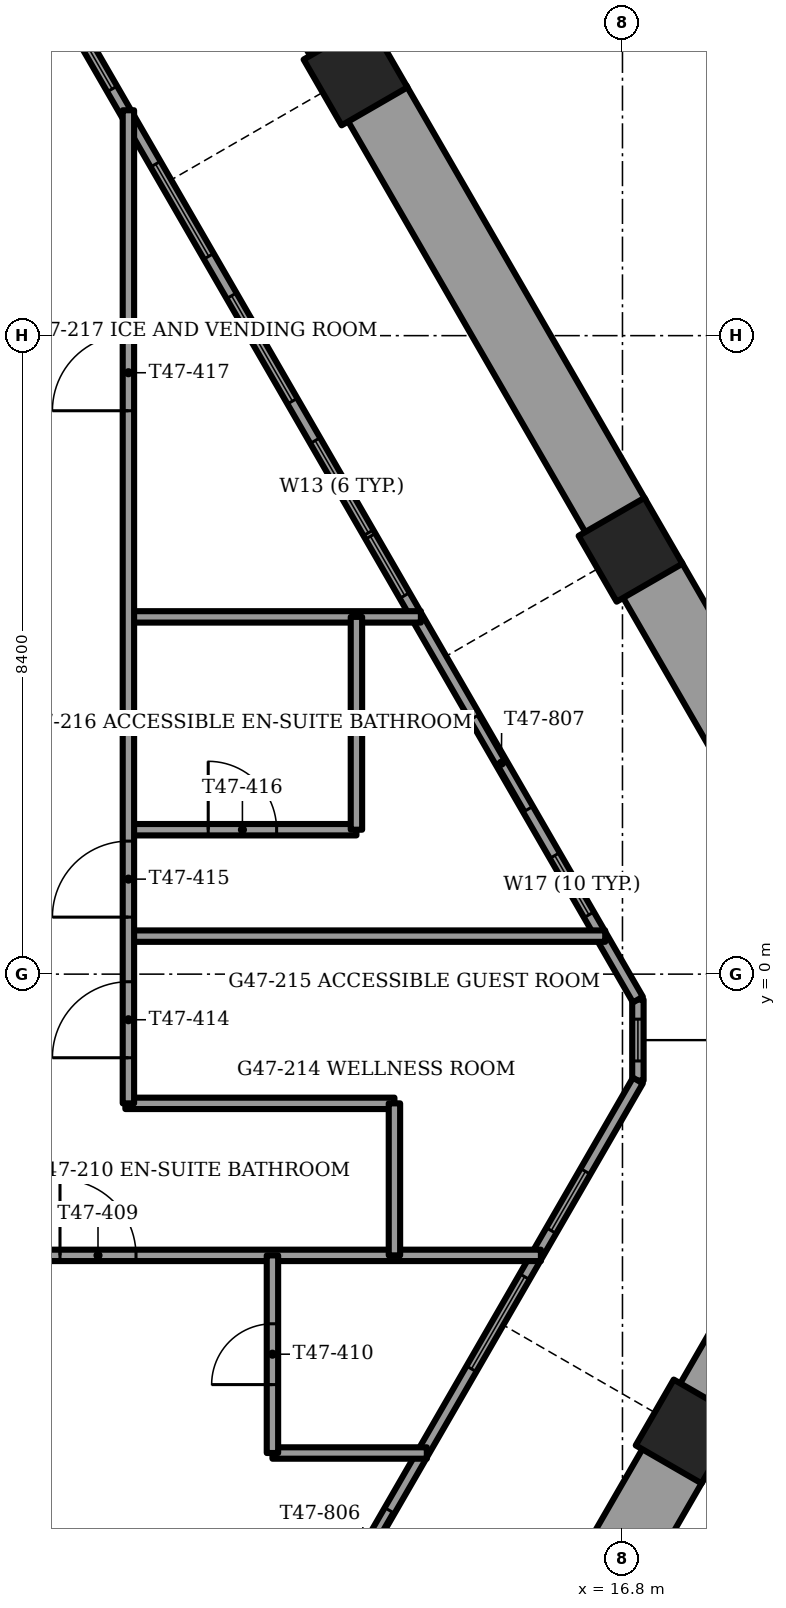
"""IFC4 building model, lengths in metres.
Left out: names, types, materials, properties, quantities, classifications, styles, units other than length and angle.
Written with IfcOpenShell. Run it as: python <this file> out.ifc"""

import sys

from ifc_helpers import new_model, si_unit, direction, frame, frame_2d, origin, origin_2d, place, context, subcontext, project, spatial, rectangle, extrude, element, fill, save


model = new_model("IFC4")
c1 = context("Model", 3, precision=1e-05, world=origin(), true_north=direction((0.0, 1.0)))
c2 = subcontext(c1, "Body", "Model", "MODEL_VIEW")
j1 = project(units=[si_unit("LENGTHUNIT", "METRE"), si_unit("PLANEANGLEUNIT", "RADIAN")], contexts=[c1])
p1 = place(None, origin())
s1 = spatial("IfcSite", under=j1, at=p1, CompositionType="ELEMENT")
p2 = place(p1, origin())
s2 = spatial("IfcBuilding", under=s1, at=p2, CompositionType="ELEMENT")
p3 = place(p2, frame((0.0, 0.0, 190.75)))
s3 = spatial("IfcBuildingStorey", under=s2, at=p3, CompositionType="ELEMENT", Elevation=190.75)
for number, where, z_axis, x_axis in (
    (1, (17.657, -6.017, -1.2), (0.0, 0.0, 1.0), (-0.5, -0.866, 0.0)),
    (2, (16.906, 5.583, -1.2), (0.0, 0.0, 1.0), (0.5, -0.866, 0.0)),
    (3, (13.288, 11.85, -1.2), (0.0, 0.0, 1.0), (0.5, -0.866, 0.0)),
):
    element("IfcColumn", number, at=place(p3, frame(where, z_axis=z_axis, x_axis=x_axis)), inside=s3, PredefinedType="COLUMN", context=c2, shape_type="SweptSolid", body=[
        extrude(rectangle(XDim=1.0, YDim=1.0, at=origin_2d()), origin(), (0.0, 0.0, 1.0), 3.75),
    ])
p4 = place(p3, frame((14.317, -11.901, 0.0), z_axis=(0.0, 0.0, 1.0), x_axis=(0.500013351051, 0.866017695414, 0.0)))
e4 = element("IfcWall", 4, at=p4, inside=s3, PredefinedType="PARAPET", context=c2, shape_type="SweptSolid", body=[
    extrude(rectangle(XDim=6.296, YDim=0.9, at=frame_2d((3.148, 0.0))), origin(), (0.0, 0.0, 1.0), 1.1),
])
p5 = place(p3, frame((17.936, -5.635, 0.0), z_axis=(0.0, 0.0, 1.0), x_axis=(0.500017732557, 0.866015165646, 0.0)))
e5 = element("IfcWall", 5, at=p5, inside=s3, PredefinedType="PARAPET", context=c2, shape_type="SweptSolid", body=[
    extrude(rectangle(XDim=4.962, YDim=0.9, at=frame_2d((2.481, 0.0))), origin(), (0.0, 0.0, 1.0), 1.1),
])
p6 = place(p3, frame((20.417, -0.398, 0.0), z_axis=(0.0, 0.0, 1.0), x_axis=(-0.499977443261, 0.866038426532, 0.0)))
e6 = element("IfcWall", 6, at=p6, inside=s3, PredefinedType="PARAPET", context=c2, shape_type="SweptSolid", body=[
    extrude(rectangle(XDim=6.465, YDim=0.9, at=frame_2d((3.232, 0.0))), origin(), (0.0, 0.0, 1.0), 1.1),
])
p7 = place(p3, frame((16.715, 6.015, 0.0), z_axis=(0.0, 0.0, 1.0), x_axis=(-0.500013351051, 0.866017695414, 0.0)))
e7 = element("IfcWall", 7, at=p7, inside=s3, PredefinedType="PARAPET", context=c2, shape_type="SweptSolid", body=[
    extrude(rectangle(XDim=6.296, YDim=0.9, at=frame_2d((3.148, 0.0))), origin(), (0.0, 0.0, 1.0), 1.1),
])
p8 = place(p3, frame((13.096, 12.282, 0.0), z_axis=(0.0, 0.0, 1.0), x_axis=(-0.500005767435, 0.866022073929, 0.0)))
e8 = element("IfcWall", 8, at=p8, inside=s3, PredefinedType="PARAPET", context=c2, shape_type="SweptSolid", body=[
    extrude(rectangle(XDim=6.465, YDim=0.9, at=frame_2d((3.232, 0.0))), origin(), (0.0, 0.0, 1.0), 1.1),
])
p9 = place(p3, frame((9.714, -14.025, 0.0), z_axis=(0.0, 0.0, 1.0), x_axis=(0.500006098247, 0.866021882931, 0.0)))
e9 = element("IfcWall", 9, at=p9, inside=s3, PredefinedType="SOLIDWALL", context=c2, shape_type="SweptSolid", body=[
    extrude(rectangle(XDim=14.578, YDim=0.15, at=frame_2d((7.289, 0.0))), origin(), (0.0, 0.0, 1.0), 3.45),
])
p10 = place(p9, frame((1.289, 0.0, 0.15)))
e10 = element("IfcOpeningElement", 10, at=p10, cuts=e9, PredefinedType="OPENING", context=c2, shape_type="SweptSolid", body=[
    extrude(rectangle(XDim=1.6, YDim=2.85, at=frame_2d((0.8, 1.425))), frame((0.0, 0.075, 0.0), z_axis=(0.0, -1.0, 0.0), x_axis=(1.0, 0.0, 0.0)), (0.0, 0.0, 1.0), 0.15),
])
p11 = place(p9, frame((3.489, 0.0, 0.0)))
e11 = element("IfcOpeningElement", 11, at=p11, cuts=e9, PredefinedType="OPENING", context=c2, shape_type="SweptSolid", body=[
    extrude(rectangle(XDim=1.4, YDim=2.4, at=frame_2d((0.7, 1.2))), frame((0.0, 0.075, 0.0), z_axis=(0.0, -1.0, 0.0), x_axis=(1.0, 0.0, 0.0)), (0.0, 0.0, 1.0), 0.15),
])
p12 = place(p9, frame((5.489, 0.0, 0.15)))
e12 = element("IfcOpeningElement", 12, at=p12, cuts=e9, PredefinedType="OPENING", context=c2, shape_type="SweptSolid", body=[
    extrude(rectangle(XDim=0.9, YDim=2.85, at=frame_2d((0.45, 1.425))), frame((0.0, 0.075, 0.0), z_axis=(0.0, -1.0, 0.0), x_axis=(1.0, 0.0, 0.0)), (0.0, 0.0, 1.0), 0.15),
])
p13 = place(p9, frame((6.646, 0.0, 0.0)))
e13 = element("IfcOpeningElement", 13, at=p13, cuts=e9, PredefinedType="OPENING", context=c2, shape_type="SweptSolid", body=[
    extrude(rectangle(XDim=1.4, YDim=2.4, at=frame_2d((0.7, 1.2))), frame((0.0, 0.075, 0.0), z_axis=(0.0, -1.0, 0.0), x_axis=(1.0, 0.0, 0.0)), (0.0, 0.0, 1.0), 0.15),
])
p14 = place(p9, frame((12.298, 0.0, 0.15)))
e14 = element("IfcOpeningElement", 14, at=p14, cuts=e9, PredefinedType="OPENING", context=c2, shape_type="SweptSolid", body=[
    extrude(rectangle(XDim=0.9, YDim=2.85, at=frame_2d((0.45, 1.425))), frame((0.0, 0.075, 0.0), z_axis=(0.0, -1.0, 0.0), x_axis=(1.0, 0.0, 0.0)), (0.0, 0.0, 1.0), 0.15),
])
p15 = place(p9, frame((10.198, 0.0, 0.15)))
e15 = element("IfcOpeningElement", 15, at=p15, cuts=e9, PredefinedType="OPENING", context=c2, shape_type="SweptSolid", body=[
    extrude(rectangle(XDim=1.4, YDim=2.85, at=frame_2d((0.7, 1.425))), frame((0.0, 0.075, 0.0), z_axis=(0.0, -1.0, 0.0), x_axis=(1.0, 0.0, 0.0)), (0.0, 0.0, 1.0), 0.15),
])
p16 = place(p3, frame((17.003, -0.335, 0.0), z_axis=(0.0, 0.0, 1.0), x_axis=(-0.50000659594, 0.866021595583, 0.0)))
e16 = element("IfcWall", 16, at=p16, inside=s3, PredefinedType="SOLIDWALL", context=c2, shape_type="SweptSolid", body=[
    extrude(rectangle(XDim=20.354, YDim=0.15, at=frame_2d((10.177, 0.0))), origin(), (0.0, 0.0, 1.0), 3.45),
])
p17 = place(p16, frame((1.288, 0.0, 0.15)))
e17 = element("IfcOpeningElement", 17, at=p17, cuts=e16, PredefinedType="OPENING", context=c2, shape_type="SweptSolid", body=[
    extrude(rectangle(XDim=0.9, YDim=2.85, at=frame_2d((0.45, 1.425))), frame((0.0, 0.075, 0.0), z_axis=(0.0, -1.0, 0.0), x_axis=(1.0, 0.0, 0.0)), (0.0, 0.0, 1.0), 0.15),
])
p18 = place(p16, frame((2.892, 0.0, 0.0)))
e18 = element("IfcOpeningElement", 18, at=p18, cuts=e16, PredefinedType="OPENING", context=c2, shape_type="SweptSolid", body=[
    extrude(rectangle(XDim=1.4, YDim=2.4, at=frame_2d((0.7, 1.2))), frame((0.0, 0.075, 0.0), z_axis=(0.0, -1.0, 0.0), x_axis=(1.0, 0.0, 0.0)), (0.0, 0.0, 1.0), 0.15),
])
p19 = place(p16, frame((6.138, 0.0, 0.15)))
e19 = element("IfcOpeningElement", 19, at=p19, cuts=e16, PredefinedType="OPENING", context=c2, shape_type="SweptSolid", body=[
    extrude(rectangle(XDim=0.9, YDim=2.85, at=frame_2d((0.45, 1.425))), frame((0.0, 0.075, 0.0), z_axis=(0.0, -1.0, 0.0), x_axis=(1.0, 0.0, 0.0)), (0.0, 0.0, 1.0), 0.15),
])
p20 = place(p16, frame((7.092, 0.0, 0.15)))
e20 = element("IfcOpeningElement", 20, at=p20, cuts=e16, PredefinedType="OPENING", context=c2, shape_type="SweptSolid", body=[
    extrude(rectangle(XDim=1.4, YDim=2.85, at=frame_2d((0.7, 1.425))), frame((0.0, 0.075, 0.0), z_axis=(0.0, -1.0, 0.0), x_axis=(1.0, 0.0, 0.0)), (0.0, 0.0, 1.0), 0.15),
])
p21 = place(p16, frame((9.092, 0.0, 0.15)))
e21 = element("IfcOpeningElement", 21, at=p21, cuts=e16, PredefinedType="OPENING", context=c2, shape_type="SweptSolid", body=[
    extrude(rectangle(XDim=1.6, YDim=2.85, at=frame_2d((0.8, 1.425))), frame((0.0, 0.075, 0.0), z_axis=(0.0, -1.0, 0.0), x_axis=(1.0, 0.0, 0.0)), (0.0, 0.0, 1.0), 0.15),
])
p22 = place(p16, frame((11.292, 0.0, 0.15)))
e22 = element("IfcOpeningElement", 22, at=p22, cuts=e16, PredefinedType="OPENING", context=c2, shape_type="SweptSolid", body=[
    extrude(rectangle(XDim=1.4, YDim=2.85, at=frame_2d((0.7, 1.425))), frame((0.0, 0.075, 0.0), z_axis=(0.0, -1.0, 0.0), x_axis=(1.0, 0.0, 0.0)), (0.0, 0.0, 1.0), 0.15),
])
p23 = place(p16, frame((13.834, 0.0, 0.15)))
e23 = element("IfcOpeningElement", 23, at=p23, cuts=e16, PredefinedType="OPENING", context=c2, shape_type="SweptSolid", body=[
    extrude(rectangle(XDim=1.6, YDim=2.85, at=frame_2d((0.8, 1.425))), frame((0.0, 0.075, 0.0), z_axis=(0.0, -1.0, 0.0), x_axis=(1.0, 0.0, 0.0)), (0.0, 0.0, 1.0), 0.15),
])
p24 = place(p16, frame((18.023, 0.0, 0.15)))
e24 = element("IfcOpeningElement", 24, at=p24, cuts=e16, PredefinedType="OPENING", context=c2, shape_type="SweptSolid", body=[
    extrude(rectangle(XDim=1.6, YDim=2.73, at=frame_2d((0.8, 1.365))), frame((0.0, 0.075, 0.0), z_axis=(0.0, -1.0, 0.0), x_axis=(1.0, 0.0, 0.0)), (0.0, 0.0, 1.0), 0.15),
])
p25 = place(p3, frame((17.003, -1.4, 0.0), z_axis=(0.0, 0.0, 1.0), x_axis=(0.0, 1.0, 0.0)))
e25 = element("IfcWall", 25, at=p25, inside=s3, PredefinedType="SOLIDWALL", context=c2, shape_type="SweptSolid", body=[
    extrude(rectangle(XDim=1.065, YDim=0.15, at=frame_2d((0.533, 0.0))), origin(), (0.0, 0.0, 1.0), 3.45),
])
p26 = place(p25, frame((0.258, 0.0, 0.15)))
e26 = element("IfcOpeningElement", 26, at=p26, cuts=e25, PredefinedType="OPENING", context=c2, shape_type="SweptSolid", body=[
    extrude(rectangle(XDim=0.55, YDim=2.85, at=frame_2d((0.275, 1.425))), frame((0.0, 0.075, 0.0), z_axis=(0.0, -1.0, 0.0), x_axis=(1.0, 0.0, 0.0)), (0.0, 0.0, 1.0), 0.15),
])
p27 = place(p3, frame((12.195, -6.3, 0.0), z_axis=(0.0, 0.0, 1.0), x_axis=(1.0, 0.0, 0.0)))
e27 = element("IfcWall", 27, at=p27, inside=s3, PredefinedType="PARTITIONING", context=c2, shape_type="SweptSolid", body=[
    extrude(rectangle(XDim=2.031, YDim=0.15, at=frame_2d((1.016, 0.0))), origin(), (0.0, 0.0, 1.0), 3.45),
])
p28 = place(p3, frame((9.16, -3.7, 0.0), z_axis=(0.0, 0.0, 1.0), x_axis=(1.0, 0.0, 0.0)))
e28 = element("IfcWall", 28, at=p28, inside=s3, PredefinedType="PARTITIONING", context=c2, shape_type="SweptSolid", body=[
    extrude(rectangle(XDim=6.567, YDim=0.15, at=frame_2d((3.284, 0.0))), origin(), (0.0, 0.0, 1.0), 3.45),
])
p29 = place(p28, frame((0.24, 0.0, 0.0)))
e29 = element("IfcOpeningElement", 29, at=p29, cuts=e28, PredefinedType="OPENING", context=c2, shape_type="SweptSolid", body=[
    extrude(rectangle(XDim=1.0, YDim=2.1, at=frame_2d((0.5, 1.05))), frame((0.0, 0.075, 0.0), z_axis=(0.0, -1.0, 0.0), x_axis=(1.0, 0.0, 0.0)), (0.0, 0.0, 1.0), 0.15),
])
p30 = place(p3, frame((10.26, -1.7, 0.0), z_axis=(0.0, 0.0, 1.0), x_axis=(1.0, 0.0, 0.0)))
e30 = element("IfcWall", 30, at=p30, inside=s3, PredefinedType="PARTITIONING", context=c2, shape_type="SweptSolid", body=[
    extrude(rectangle(XDim=3.54, YDim=0.15, at=frame_2d((1.77, 0.0))), origin(), (0.0, 0.0, 1.0), 3.45),
])
p31 = place(p3, frame((10.3, 0.5, 0.0), z_axis=(0.0, 0.0, 1.0), x_axis=(1.0, 0.0, 0.0)))
e31 = element("IfcWall", 31, at=p31, inside=s3, PredefinedType="PARTITIONING", context=c2, shape_type="SweptSolid", body=[
    extrude(rectangle(XDim=6.273, YDim=0.15, at=frame_2d((3.136, 0.0))), origin(), (0.0, 0.0, 1.0), 3.45),
])
p32 = place(p3, frame((10.3, 1.9, 0.0), z_axis=(0.0, 0.0, 1.0), x_axis=(1.0, 0.0, 0.0)))
e32 = element("IfcWall", 32, at=p32, inside=s3, PredefinedType="PARTITIONING", context=c2, shape_type="SweptSolid", body=[
    extrude(rectangle(XDim=3.0, YDim=0.15, at=frame_2d((1.5, 0.0))), origin(), (0.0, 0.0, 1.0), 3.45),
])
p33 = place(p32, frame((1.05, 0.0, 0.0)))
e33 = element("IfcOpeningElement", 33, at=p33, cuts=e32, PredefinedType="OPENING", context=c2, shape_type="SweptSolid", body=[
    extrude(rectangle(XDim=0.9, YDim=2.1, at=frame_2d((0.45, 1.05))), frame((0.0, 0.075, 0.0), z_axis=(0.0, -1.0, 0.0), x_axis=(1.0, 0.0, 0.0)), (0.0, 0.0, 1.0), 0.15),
])
p34 = place(p3, frame((10.3, 4.7, 0.0), z_axis=(0.0, 0.0, 1.0), x_axis=(1.0, 0.0, 0.0)))
e34 = element("IfcWall", 34, at=p34, inside=s3, PredefinedType="PARTITIONING", context=c2, shape_type="SweptSolid", body=[
    extrude(rectangle(XDim=3.848, YDim=0.15, at=frame_2d((1.924, 0.0))), origin(), (0.0, 0.0, 1.0), 3.45),
])
p35 = place(p3, frame((13.8, -3.7, 0.0), z_axis=(0.0, 0.0, 1.0), x_axis=(0.0, 1.0, 0.0)))
e35 = element("IfcWall", 35, at=p35, inside=s3, PredefinedType="PARTITIONING", context=c2, shape_type="SweptSolid", body=[
    extrude(rectangle(XDim=2.0, YDim=0.15, at=frame_2d((1.0, 0.0))), origin(), (0.0, 0.0, 1.0), 3.45),
])
p36 = place(p3, frame((13.3, 1.9, 0.0), z_axis=(0.0, 0.0, 1.0), x_axis=(0.0, 1.0, 0.0)))
e36 = element("IfcWall", 36, at=p36, inside=s3, PredefinedType="PARTITIONING", context=c2, shape_type="SweptSolid", body=[
    extrude(rectangle(XDim=2.8, YDim=0.15, at=frame_2d((1.4, 0.0))), origin(), (0.0, 0.0, 1.0), 3.45),
])
p37 = place(p3, frame((12.195, -6.3, 0.0), z_axis=(0.0, 0.0, 1.0), x_axis=(0.0, 1.0, 0.0)))
e37 = element("IfcWall", 37, at=p37, inside=s3, PredefinedType="PARTITIONING", context=c2, shape_type="SweptSolid", body=[
    extrude(rectangle(XDim=2.6, YDim=0.15, at=frame_2d((1.3, 0.0))), origin(), (0.0, 0.0, 1.0), 3.45),
])
p38 = place(p37, frame((0.9, 0.0, 0.0)))
e38 = element("IfcOpeningElement", 38, at=p38, cuts=e37, PredefinedType="OPENING", context=c2, shape_type="SweptSolid", body=[
    extrude(rectangle(XDim=0.8, YDim=2.1, at=frame_2d((0.4, 1.05))), frame((0.0, 0.075, 0.0), z_axis=(0.0, -1.0, 0.0), x_axis=(1.0, 0.0, 0.0)), (0.0, 0.0, 1.0), 0.15),
])
p39 = place(p3, frame((10.3, -1.7, 0.0), z_axis=(0.0, 0.0, 1.0), x_axis=(0.0, 1.0, 0.0)))
e39 = element("IfcWall", 39, at=p39, inside=s3, PredefinedType="PARTITIONING", context=c2, shape_type="SweptSolid", body=[
    extrude(rectangle(XDim=13.065, YDim=0.15, at=frame_2d((6.532, 0.0))), origin(), (0.0, 0.0, 1.0), 3.45),
])
p40 = place(p39, frame((0.6, 0.0, 0.0)))
e40 = element("IfcOpeningElement", 40, at=p40, cuts=e39, PredefinedType="OPENING", context=c2, shape_type="SweptSolid", body=[
    extrude(rectangle(XDim=1.0, YDim=2.1, at=frame_2d((0.5, 1.05))), frame((0.0, 0.075, 0.0), z_axis=(0.0, -1.0, 0.0), x_axis=(1.0, 0.0, 0.0)), (0.0, 0.0, 1.0), 0.15),
])
p41 = place(p39, frame((2.45, 0.0, 0.0)))
e41 = element("IfcOpeningElement", 41, at=p41, cuts=e39, PredefinedType="OPENING", context=c2, shape_type="SweptSolid", body=[
    extrude(rectangle(XDim=1.0, YDim=2.1, at=frame_2d((0.5, 1.05))), frame((0.0, 0.075, 0.0), z_axis=(0.0, -1.0, 0.0), x_axis=(1.0, 0.0, 0.0)), (0.0, 0.0, 1.0), 0.15),
])
p42 = place(p39, frame((9.112, 0.0, 0.0)))
e42 = element("IfcOpeningElement", 42, at=p42, cuts=e39, PredefinedType="OPENING", context=c2, shape_type="SweptSolid", body=[
    extrude(rectangle(XDim=1.0, YDim=2.1, at=frame_2d((0.5, 1.05))), frame((0.0, 0.075, 0.0), z_axis=(0.0, -1.0, 0.0), x_axis=(1.0, 0.0, 0.0)), (0.0, 0.0, 1.0), 0.15),
])
p43 = place(p13, origin())
e43 = element("IfcDoor", 43, at=p43, inside=s3, OperationType="SLIDING_TO_RIGHT", PredefinedType="DOOR", context=c2, shape_type="SweptSolid", body=[
    extrude(rectangle(XDim=1.4, YDim=2.4, at=frame_2d((0.7, 1.2))), frame((0.0, 0.025, 0.0), z_axis=(0.0, -1.0, 0.0), x_axis=(1.0, 0.0, 0.0)), (0.0, 0.0, 1.0), 0.05),
])
fill(e13, e43)
p44 = place(p14, origin())
e44 = element("IfcWindow", 44, at=p44, inside=s3, PartitioningType="SINGLE_PANEL", PredefinedType="WINDOW", context=c2, shape_type="SweptSolid", body=[
    extrude(rectangle(XDim=0.9, YDim=2.85, at=frame_2d((0.45, 1.425))), frame((0.0, 0.03, 0.0), z_axis=(0.0, -1.0, 0.0), x_axis=(1.0, 0.0, 0.0)), (0.0, 0.0, 1.0), 0.06),
])
fill(e14, e44)
p45 = place(p15, origin())
e45 = element("IfcWindow", 45, at=p45, inside=s3, PartitioningType="SINGLE_PANEL", PredefinedType="WINDOW", context=c2, shape_type="SweptSolid", body=[
    extrude(rectangle(XDim=1.4, YDim=2.85, at=frame_2d((0.7, 1.425))), frame((0.0, 0.03, 0.0), z_axis=(0.0, -1.0, 0.0), x_axis=(1.0, 0.0, 0.0)), (0.0, 0.0, 1.0), 0.06),
])
fill(e15, e45)
p46 = place(p17, origin())
e46 = element("IfcWindow", 46, at=p46, inside=s3, PartitioningType="SINGLE_PANEL", PredefinedType="WINDOW", context=c2, shape_type="SweptSolid", body=[
    extrude(rectangle(XDim=0.9, YDim=2.85, at=frame_2d((0.45, 1.425))), frame((0.0, 0.03, 0.0), z_axis=(0.0, -1.0, 0.0), x_axis=(1.0, 0.0, 0.0)), (0.0, 0.0, 1.0), 0.06),
])
fill(e17, e46)
p47 = place(p18, origin())
e47 = element("IfcDoor", 47, at=p47, inside=s3, OperationType="SLIDING_TO_LEFT", PredefinedType="DOOR", context=c2, shape_type="SweptSolid", body=[
    extrude(rectangle(XDim=1.4, YDim=2.4, at=frame_2d((0.7, 1.2))), frame((0.0, 0.025, 0.0), z_axis=(0.0, -1.0, 0.0), x_axis=(1.0, 0.0, 0.0)), (0.0, 0.0, 1.0), 0.05),
])
fill(e18, e47)
p48 = place(p19, origin())
e48 = element("IfcWindow", 48, at=p48, inside=s3, PartitioningType="SINGLE_PANEL", PredefinedType="WINDOW", context=c2, shape_type="SweptSolid", body=[
    extrude(rectangle(XDim=0.9, YDim=2.85, at=frame_2d((0.45, 1.425))), frame((0.0, 0.03, 0.0), z_axis=(0.0, -1.0, 0.0), x_axis=(1.0, 0.0, 0.0)), (0.0, 0.0, 1.0), 0.06),
])
fill(e19, e48)
p49 = place(p20, origin())
e49 = element("IfcWindow", 49, at=p49, inside=s3, PartitioningType="SINGLE_PANEL", PredefinedType="WINDOW", context=c2, shape_type="SweptSolid", body=[
    extrude(rectangle(XDim=1.4, YDim=2.85, at=frame_2d((0.7, 1.425))), frame((0.0, 0.03, 0.0), z_axis=(0.0, -1.0, 0.0), x_axis=(1.0, 0.0, 0.0)), (0.0, 0.0, 1.0), 0.06),
])
fill(e20, e49)
p50 = place(p21, origin())
e50 = element("IfcWindow", 50, at=p50, inside=s3, PartitioningType="SINGLE_PANEL", PredefinedType="WINDOW", context=c2, shape_type="SweptSolid", body=[
    extrude(rectangle(XDim=1.6, YDim=2.85, at=frame_2d((0.8, 1.425))), frame((0.0, 0.03, 0.0), z_axis=(0.0, -1.0, 0.0), x_axis=(1.0, 0.0, 0.0)), (0.0, 0.0, 1.0), 0.06),
])
fill(e21, e50)
p51 = place(p22, origin())
e51 = element("IfcWindow", 51, at=p51, inside=s3, PartitioningType="SINGLE_PANEL", PredefinedType="WINDOW", context=c2, shape_type="SweptSolid", body=[
    extrude(rectangle(XDim=1.4, YDim=2.85, at=frame_2d((0.7, 1.425))), frame((0.0, 0.03, 0.0), z_axis=(0.0, -1.0, 0.0), x_axis=(1.0, 0.0, 0.0)), (0.0, 0.0, 1.0), 0.06),
])
fill(e22, e51)
p52 = place(p23, origin())
e52 = element("IfcWindow", 52, at=p52, inside=s3, PartitioningType="SINGLE_PANEL", PredefinedType="WINDOW", context=c2, shape_type="SweptSolid", body=[
    extrude(rectangle(XDim=1.6, YDim=2.85, at=frame_2d((0.8, 1.425))), frame((0.0, 0.03, 0.0), z_axis=(0.0, -1.0, 0.0), x_axis=(1.0, 0.0, 0.0)), (0.0, 0.0, 1.0), 0.06),
])
fill(e23, e52)
p53 = place(p26, origin())
e53 = element("IfcWindow", 53, at=p53, inside=s3, PartitioningType="SINGLE_PANEL", PredefinedType="WINDOW", context=c2, shape_type="SweptSolid", body=[
    extrude(rectangle(XDim=0.55, YDim=2.85, at=frame_2d((0.275, 1.425))), frame((0.0, 0.03, 0.0), z_axis=(0.0, -1.0, 0.0), x_axis=(1.0, 0.0, 0.0)), (0.0, 0.0, 1.0), 0.06),
])
fill(e26, e53)
p54 = place(p29, origin())
e54 = element("IfcDoor", 54, at=p54, inside=s3, OperationType="SINGLE_SWING_LEFT", PredefinedType="DOOR", context=c2, shape_type="SweptSolid", body=[
    extrude(rectangle(XDim=1.0, YDim=2.1, at=frame_2d((0.5, 1.05))), frame((0.0, 0.025, 0.0), z_axis=(0.0, -1.0, 0.0), x_axis=(1.0, 0.0, 0.0)), (0.0, 0.0, 1.0), 0.05),
])
fill(e29, e54)
p55 = place(p38, origin())
e55 = element("IfcDoor", 55, at=p55, inside=s3, OperationType="SINGLE_SWING_RIGHT", PredefinedType="DOOR", context=c2, shape_type="SweptSolid", body=[
    extrude(rectangle(XDim=0.8, YDim=2.1, at=frame_2d((0.4, 1.05))), frame((0.0, 0.025, 0.0), z_axis=(0.0, -1.0, 0.0), x_axis=(1.0, 0.0, 0.0)), (0.0, 0.0, 1.0), 0.05),
])
fill(e38, e55)
p56 = place(p40, origin())
e56 = element("IfcDoor", 56, at=p56, inside=s3, OperationType="SINGLE_SWING_LEFT", PredefinedType="DOOR", context=c2, shape_type="SweptSolid", body=[
    extrude(rectangle(XDim=1.0, YDim=2.1, at=frame_2d((0.5, 1.05))), frame((0.0, 0.025, 0.0), z_axis=(0.0, -1.0, 0.0), x_axis=(1.0, 0.0, 0.0)), (0.0, 0.0, 1.0), 0.05),
])
fill(e40, e56)
p57 = place(p41, origin())
e57 = element("IfcDoor", 57, at=p57, inside=s3, OperationType="SINGLE_SWING_LEFT", PredefinedType="DOOR", context=c2, shape_type="SweptSolid", body=[
    extrude(rectangle(XDim=1.0, YDim=2.1, at=frame_2d((0.5, 1.05))), frame((0.0, 0.025, 0.0), z_axis=(0.0, -1.0, 0.0), x_axis=(1.0, 0.0, 0.0)), (0.0, 0.0, 1.0), 0.05),
])
fill(e41, e57)
p58 = place(p33, origin())
e58 = element("IfcDoor", 58, at=p58, inside=s3, OperationType="SINGLE_SWING_LEFT", PredefinedType="DOOR", context=c2, shape_type="SweptSolid", body=[
    extrude(rectangle(XDim=0.9, YDim=2.1, at=frame_2d((0.45, 1.05))), frame((0.0, 0.025, 0.0), z_axis=(0.0, -1.0, 0.0), x_axis=(1.0, 0.0, 0.0)), (0.0, 0.0, 1.0), 0.05),
])
fill(e33, e58)
p59 = place(p42, origin())
e59 = element("IfcDoor", 59, at=p59, inside=s3, OperationType="SINGLE_SWING_LEFT", PredefinedType="DOOR", context=c2, shape_type="SweptSolid", body=[
    extrude(rectangle(XDim=1.0, YDim=2.1, at=frame_2d((0.5, 1.05))), frame((0.0, 0.025, 0.0), z_axis=(0.0, -1.0, 0.0), x_axis=(1.0, 0.0, 0.0)), (0.0, 0.0, 1.0), 0.05),
])
fill(e42, e59)
save(model, sys.argv[1])
